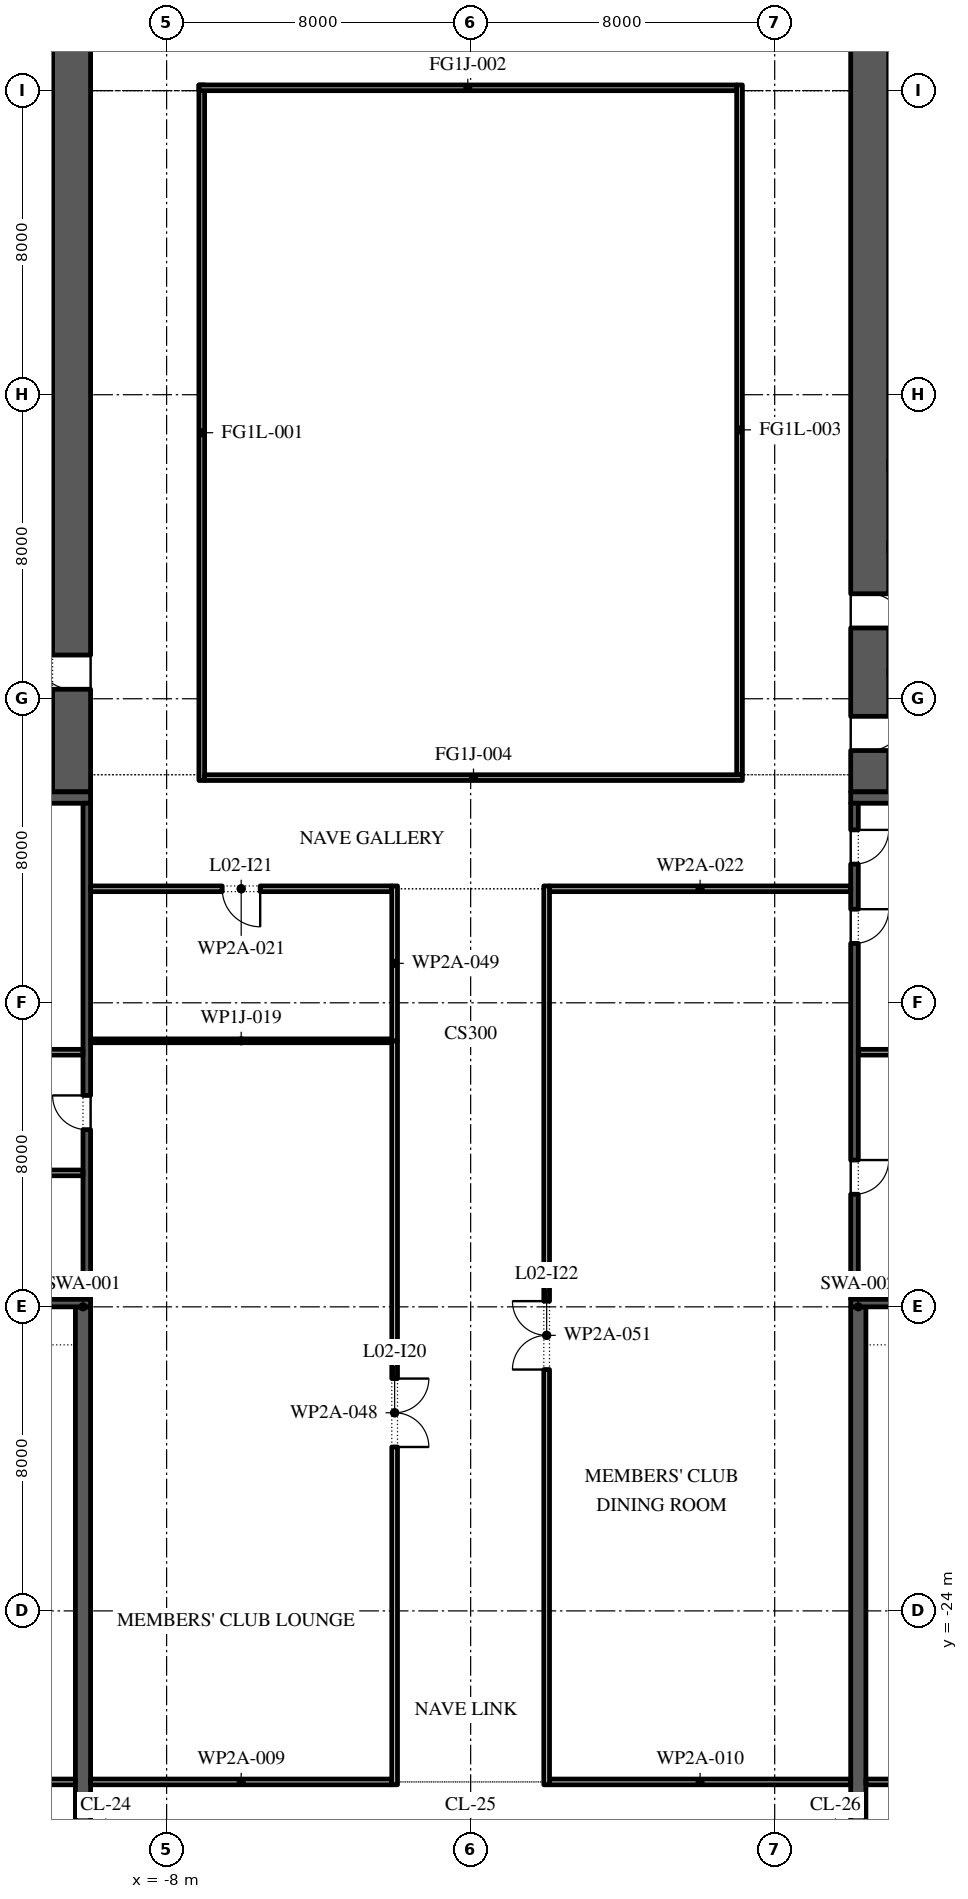
"""IFC4 building model, lengths in metres.
Left out: names, types, materials, properties, quantities, classifications, styles, units other than length and angle.
Written with IfcOpenShell. Run it as: python <this file> out.ifc"""

import sys

from ifc_helpers import new_model, si_unit, direction, frame, frame_2d, origin, place, context, subcontext, project, spatial, rectangle, extrude, element, fill, save


model = new_model("IFC4")
c1 = context("Model", 3, precision=1e-05, world=origin(), true_north=direction((0.0, 1.0)))
c2 = subcontext(c1, "Body", "Model", "MODEL_VIEW")
j1 = project(units=[si_unit("LENGTHUNIT", "METRE"), si_unit("PLANEANGLEUNIT", "RADIAN")], contexts=[c1])
p1 = place(None, origin())
s1 = spatial("IfcSite", under=j1, at=p1, CompositionType="ELEMENT")
p2 = place(p1, origin())
s2 = spatial("IfcBuilding", under=s1, at=p2, CompositionType="ELEMENT")
p3 = place(p2, frame((0.0, 0.0, 14.0)))
s3 = spatial("IfcBuildingStorey", under=s2, at=p3, CompositionType="ELEMENT", Elevation=14.0)
for number, where, z_axis, x_axis in (
    (1, (-10.2, -31.0, 0.0), (0.0, 0.0, 1.0), (0.0, 1.0, 0.0)),
    (2, (10.2, -31.0, 0.0), (0.0, 0.0, 1.0), (0.0, 1.0, 0.0)),
):
    element("IfcWall", number, at=place(p3, frame(where, z_axis=z_axis, x_axis=x_axis)), inside=s3, PredefinedType="SHEAR", context=c2, shape_type="SweptSolid", body=[
        extrude(rectangle(XDim=15.0, YDim=0.4, at=frame_2d((7.5, 0.0))), origin(), (0.0, 0.0, 1.0), 4.9),
    ])
p4 = place(p3, frame((-7.075, -2.15, 0.0), z_axis=(0.0, 0.0, 1.0), x_axis=(0.0, 1.0, 0.0)))
e3 = element("IfcWall", 3, at=p4, inside=s3, PredefinedType="STANDARD", context=c2, shape_type="SweptSolid", body=[
    extrude(rectangle(XDim=18.3, YDim=0.15, at=frame_2d((9.15, 0.0))), origin(), (0.0, 0.0, 1.0), 4.9),
])
p5 = place(p3, frame((-7.15, 16.075, 0.0), z_axis=(0.0, 0.0, 1.0), x_axis=(1.0, 0.0, 0.0)))
e4 = element("IfcWall", 4, at=p5, inside=s3, PredefinedType="STANDARD", context=c2, shape_type="SweptSolid", body=[
    extrude(rectangle(XDim=14.15, YDim=0.15, at=frame_2d((7.075, 0.0))), origin(), (0.0, 0.0, 1.0), 3.92),
])
p6 = place(p3, frame((7.075, 16.15, 0.0), z_axis=(0.0, 0.0, 1.0), x_axis=(0.0, -1.0, 0.0)))
e5 = element("IfcWall", 5, at=p6, inside=s3, PredefinedType="STANDARD", context=c2, shape_type="SweptSolid", body=[
    extrude(rectangle(XDim=18.15, YDim=0.15, at=frame_2d((9.075, 0.0))), origin(), (0.0, 0.0, 1.0), 4.9),
])
p7 = place(p3, frame((7.15, -2.075, 0.0), z_axis=(0.0, 0.0, 1.0), x_axis=(-1.0, 0.0, 0.0)))
e6 = element("IfcWall", 6, at=p7, inside=s3, PredefinedType="STANDARD", context=c2, shape_type="SweptSolid", body=[
    extrude(rectangle(XDim=14.15, YDim=0.15, at=frame_2d((7.075, 0.0))), origin(), (0.0, 0.0, 1.0), 3.92),
])
p8 = place(p3, frame((-10.5, -2.45, 0.0), z_axis=(0.0, 0.0, 1.0), x_axis=(0.0, 1.0, 0.0)))
e7 = element("IfcWall", 7, at=p8, inside=s3, PredefinedType="SHEAR", context=c2, shape_type="SweptSolid", body=[
    extrude(rectangle(XDim=27.9, YDim=1.0, at=frame_2d((13.95, 0.0))), origin(), (0.0, 0.0, 1.0), 4.9),
])
p9 = place(p8, frame((23.65, 0.0, 0.0)))
e8 = element("IfcOpeningElement", 8, at=p9, cuts=e7, PredefinedType="OPENING", context=c2, shape_type="SweptSolid", body=[
    extrude(rectangle(XDim=2.4, YDim=2.1, at=frame_2d((1.2, 1.05))), frame((0.0, 0.51, 0.0), z_axis=(0.0, -1.0, 0.0), x_axis=(1.0, 0.0, 0.0)), (0.0, 0.0, 1.0), 1.02),
])
p10 = place(p8, frame((2.7, 0.0, 0.0)))
e9 = element("IfcOpeningElement", 9, at=p10, cuts=e7, PredefinedType="OPENING", context=c2, shape_type="SweptSolid", body=[
    extrude(rectangle(XDim=0.9, YDim=2.1, at=frame_2d((0.45, 1.05))), frame((0.0, 0.51, 0.0), z_axis=(0.0, -1.0, 0.0), x_axis=(1.0, 0.0, 0.0)), (0.0, 0.0, 1.0), 1.02),
])
p11 = place(p3, frame((-22.0, -2.6, 0.0), z_axis=(0.0, 0.0, 1.0), x_axis=(1.0, 0.0, 0.0)))
e10 = element("IfcWall", 10, at=p11, inside=s3, PredefinedType="SHEAR", context=c2, shape_type="SweptSolid", body=[
    extrude(rectangle(XDim=12.0, YDim=0.3, at=frame_2d((6.0, 0.0))), origin(), (0.0, 0.0, 1.0), 4.9),
])
p12 = place(p3, frame((-10.1, -15.8, 0.0), z_axis=(0.0, 0.0, 1.0), x_axis=(0.0, 1.0, 0.0)))
e11 = element("IfcWall", 11, at=p12, inside=s3, PredefinedType="SHEAR", context=c2, shape_type="SweptSolid", body=[
    extrude(rectangle(XDim=13.05, YDim=0.2, at=frame_2d((6.525, 0.0))), origin(), (0.0, 0.0, 1.0), 4.9),
])
p13 = place(p12, frame((4.462, 0.0, 0.0)))
e12 = element("IfcOpeningElement", 12, at=p13, cuts=e11, PredefinedType="OPENING", context=c2, shape_type="SweptSolid", body=[
    extrude(rectangle(XDim=0.9, YDim=2.1, at=frame_2d((0.45, 1.05))), frame((0.0, 0.11, 0.0), z_axis=(0.0, -1.0, 0.0), x_axis=(1.0, 0.0, 0.0)), (0.0, 0.0, 1.0), 0.22),
])
p14 = place(p3, frame((-22.0, -15.9, 0.0), z_axis=(0.0, 0.0, 1.0), x_axis=(1.0, 0.0, 0.0)))
e13 = element("IfcWall", 13, at=p14, inside=s3, PredefinedType="SHEAR", context=c2, shape_type="SweptSolid", body=[
    extrude(rectangle(XDim=12.0, YDim=0.2, at=frame_2d((6.0, 0.0))), origin(), (0.0, 0.0, 1.0), 4.9),
])
for number, where, z_axis, x_axis in (
    (14, (-21.8, -9.3, 0.0), (0.0, 0.0, 1.0), (1.0, 0.0, 0.0)),
    (15, (-21.8, -12.475, 0.0), (0.0, 0.0, 1.0), (1.0, 0.0, 0.0)),
):
    element("IfcWall", number, at=place(p3, frame(where, z_axis=z_axis, x_axis=x_axis)), inside=s3, PredefinedType="PARTITIONING", context=c2, shape_type="SweptSolid", body=[
        extrude(rectangle(XDim=11.6, YDim=0.15, at=frame_2d((5.8, 0.0))), origin(), (0.0, 0.0, 1.0), 4.9),
    ])
p15 = place(p3, frame((10.5, -2.45, 0.0), z_axis=(0.0, 0.0, 1.0), x_axis=(0.0, 1.0, 0.0)))
e16 = element("IfcWall", 16, at=p15, inside=s3, PredefinedType="SHEAR", context=c2, shape_type="SweptSolid", body=[
    extrude(rectangle(XDim=27.9, YDim=1.0, at=frame_2d((13.95, 0.0))), origin(), (0.0, 0.0, 1.0), 4.9),
])
p16 = place(p15, frame((23.65, 0.0, 0.0)))
e17 = element("IfcOpeningElement", 17, at=p16, cuts=e16, PredefinedType="OPENING", context=c2, shape_type="SweptSolid", body=[
    extrude(rectangle(XDim=2.4, YDim=2.1, at=frame_2d((1.2, 1.05))), frame((0.0, 0.51, 0.0), z_axis=(0.0, -1.0, 0.0), x_axis=(1.0, 0.0, 0.0)), (0.0, 0.0, 1.0), 1.02),
])
p17 = place(p15, frame((1.087, 0.0, 0.0)))
e18 = element("IfcOpeningElement", 18, at=p17, cuts=e16, PredefinedType="OPENING", context=c2, shape_type="SweptSolid", body=[
    extrude(rectangle(XDim=0.9, YDim=2.1, at=frame_2d((0.45, 1.05))), frame((0.0, 0.51, 0.0), z_axis=(0.0, -1.0, 0.0), x_axis=(1.0, 0.0, 0.0)), (0.0, 0.0, 1.0), 1.02),
])
p18 = place(p15, frame((4.312, 0.0, 0.0)))
e19 = element("IfcOpeningElement", 19, at=p18, cuts=e16, PredefinedType="OPENING", context=c2, shape_type="SweptSolid", body=[
    extrude(rectangle(XDim=0.9, YDim=2.1, at=frame_2d((0.45, 1.05))), frame((0.0, 0.51, 0.0), z_axis=(0.0, -1.0, 0.0), x_axis=(1.0, 0.0, 0.0)), (0.0, 0.0, 1.0), 1.02),
])
p19 = place(p3, frame((10.0, -2.6, 0.0), z_axis=(0.0, 0.0, 1.0), x_axis=(1.0, 0.0, 0.0)))
e20 = element("IfcWall", 20, at=p19, inside=s3, PredefinedType="SHEAR", context=c2, shape_type="SweptSolid", body=[
    extrude(rectangle(XDim=12.0, YDim=0.3, at=frame_2d((6.0, 0.0))), origin(), (0.0, 0.0, 1.0), 4.9),
])
p20 = place(p3, frame((10.1, -15.8, 0.0), z_axis=(0.0, 0.0, 1.0), x_axis=(0.0, 1.0, 0.0)))
e21 = element("IfcWall", 21, at=p20, inside=s3, PredefinedType="SHEAR", context=c2, shape_type="SweptSolid", body=[
    extrude(rectangle(XDim=13.05, YDim=0.2, at=frame_2d((6.525, 0.0))), origin(), (0.0, 0.0, 1.0), 4.9),
])
p21 = place(p20, frame((2.762, 0.0, 0.0)))
e22 = element("IfcOpeningElement", 22, at=p21, cuts=e21, PredefinedType="OPENING", context=c2, shape_type="SweptSolid", body=[
    extrude(rectangle(XDim=0.9, YDim=2.1, at=frame_2d((0.45, 1.05))), frame((0.0, 0.11, 0.0), z_axis=(0.0, -1.0, 0.0), x_axis=(1.0, 0.0, 0.0)), (0.0, 0.0, 1.0), 0.22),
])
p22 = place(p20, frame((9.363, 0.0, 0.0)))
e23 = element("IfcOpeningElement", 23, at=p22, cuts=e21, PredefinedType="OPENING", context=c2, shape_type="SweptSolid", body=[
    extrude(rectangle(XDim=0.9, YDim=2.1, at=frame_2d((0.45, 1.05))), frame((0.0, 0.11, 0.0), z_axis=(0.0, -1.0, 0.0), x_axis=(1.0, 0.0, 0.0)), (0.0, 0.0, 1.0), 0.22),
])
p23 = place(p20, frame((11.45, 0.0, 0.0)))
e24 = element("IfcOpeningElement", 24, at=p23, cuts=e21, PredefinedType="OPENING", context=c2, shape_type="SweptSolid", body=[
    extrude(rectangle(XDim=0.9, YDim=2.1, at=frame_2d((0.45, 1.05))), frame((0.0, 0.11, 0.0), z_axis=(0.0, -1.0, 0.0), x_axis=(1.0, 0.0, 0.0)), (0.0, 0.0, 1.0), 0.22),
])
p24 = place(p3, frame((10.0, -15.9, 0.0), z_axis=(0.0, 0.0, 1.0), x_axis=(1.0, 0.0, 0.0)))
e25 = element("IfcWall", 25, at=p24, inside=s3, PredefinedType="SHEAR", context=c2, shape_type="SweptSolid", body=[
    extrude(rectangle(XDim=12.0, YDim=0.2, at=frame_2d((6.0, 0.0))), origin(), (0.0, 0.0, 1.0), 4.9),
])
p25 = place(p3, frame((10.2, -9.3, 0.0), z_axis=(0.0, 0.0, 1.0), x_axis=(1.0, 0.0, 0.0)))
e26 = element("IfcWall", 26, at=p25, inside=s3, PredefinedType="PARTITIONING", context=c2, shape_type="SweptSolid", body=[
    extrude(rectangle(XDim=5.8, YDim=0.15, at=frame_2d((2.9, 0.0))), origin(), (0.0, 0.0, 1.0), 4.9),
])
p26 = place(p3, frame((-21.925, -28.5, 0.0), z_axis=(0.0, 0.0, 1.0), x_axis=(1.0, 0.0, 0.0)))
e27 = element("IfcWall", 27, at=p26, inside=s3, PredefinedType="PARTITIONING", context=c2, shape_type="SweptSolid", body=[
    extrude(rectangle(XDim=11.525, YDim=0.15, at=frame_2d((5.763, 0.0))), origin(), (0.0, 0.0, 1.0), 4.9),
])
for number, where, z_axis, x_axis in (
    (28, (-10.0, -28.5, 0.0), (0.0, 0.0, 1.0), (1.0, 0.0, 0.0)),
    (29, (2.075, -28.5, 0.0), (0.0, 0.0, 1.0), (1.0, 0.0, 0.0)),
):
    element("IfcWall", number, at=place(p3, frame(where, z_axis=z_axis, x_axis=x_axis)), inside=s3, PredefinedType="PARTITIONING", context=c2, shape_type="SweptSolid", body=[
        extrude(rectangle(XDim=7.925, YDim=0.15, at=frame_2d((3.962, 0.0))), origin(), (0.0, 0.0, 1.0), 4.9),
    ])
p27 = place(p3, frame((10.4, -28.5, 0.0), z_axis=(0.0, 0.0, 1.0), x_axis=(1.0, 0.0, 0.0)))
e30 = element("IfcWall", 30, at=p27, inside=s3, PredefinedType="PARTITIONING", context=c2, shape_type="SweptSolid", body=[
    extrude(rectangle(XDim=11.525, YDim=0.15, at=frame_2d((5.763, 0.0))), origin(), (0.0, 0.0, 1.0), 4.9),
])
p28 = place(p3, frame((-10.0, -9.0, 0.0), z_axis=(0.0, 0.0, 1.0), x_axis=(1.0, 0.0, 0.0)))
e31 = element("IfcWall", 31, at=p28, inside=s3, PredefinedType="PARTITIONING", context=c2, shape_type="SweptSolid", body=[
    extrude(rectangle(XDim=7.925, YDim=0.1, at=frame_2d((3.962, 0.0))), origin(), (0.0, 0.0, 1.0), 4.9),
])
p29 = place(p3, frame((-10.0, -5.0, 0.0), z_axis=(0.0, 0.0, 1.0), x_axis=(1.0, 0.0, 0.0)))
e32 = element("IfcWall", 32, at=p29, inside=s3, PredefinedType="PARTITIONING", context=c2, shape_type="SweptSolid", body=[
    extrude(rectangle(XDim=7.925, YDim=0.15, at=frame_2d((3.962, 0.0))), origin(), (0.0, 0.0, 1.0), 4.9),
])
p30 = place(p29, frame((3.462, 0.0, 0.0)))
e33 = element("IfcOpeningElement", 33, at=p30, cuts=e32, PredefinedType="OPENING", context=c2, shape_type="SweptSolid", body=[
    extrude(rectangle(XDim=1.0, YDim=2.1, at=frame_2d((0.5, 1.05))), frame((0.0, 0.085, 0.0), z_axis=(0.0, -1.0, 0.0), x_axis=(1.0, 0.0, 0.0)), (0.0, 0.0, 1.0), 0.17),
])
p31 = place(p3, frame((2.075, -5.0, 0.0), z_axis=(0.0, 0.0, 1.0), x_axis=(1.0, 0.0, 0.0)))
e34 = element("IfcWall", 34, at=p31, inside=s3, PredefinedType="PARTITIONING", context=c2, shape_type="SweptSolid", body=[
    extrude(rectangle(XDim=7.925, YDim=0.15, at=frame_2d((3.962, 0.0))), origin(), (0.0, 0.0, 1.0), 4.9),
])
p32 = place(p3, frame((-2.0, -28.575, 0.0), z_axis=(0.0, 0.0, 1.0), x_axis=(0.0, 1.0, 0.0)))
e35 = element("IfcWall", 35, at=p32, inside=s3, PredefinedType="PARTITIONING", context=c2, shape_type="SweptSolid", body=[
    extrude(rectangle(XDim=19.575, YDim=0.15, at=frame_2d((9.788, 0.0))), origin(), (0.0, 0.0, 1.0), 4.9),
])
p33 = place(p32, frame((8.887, 0.0, 0.0)))
e36 = element("IfcOpeningElement", 36, at=p33, cuts=e35, PredefinedType="OPENING", context=c2, shape_type="SweptSolid", body=[
    extrude(rectangle(XDim=1.8, YDim=2.1, at=frame_2d((0.9, 1.05))), frame((0.0, 0.085, 0.0), z_axis=(0.0, -1.0, 0.0), x_axis=(1.0, 0.0, 0.0)), (0.0, 0.0, 1.0), 0.17),
])
p34 = place(p3, frame((-2.0, -9.0, 0.0), z_axis=(0.0, 0.0, 1.0), x_axis=(0.0, 1.0, 0.0)))
e37 = element("IfcWall", 37, at=p34, inside=s3, PredefinedType="PARTITIONING", context=c2, shape_type="SweptSolid", body=[
    extrude(rectangle(XDim=4.075, YDim=0.15, at=frame_2d((2.038, 0.0))), origin(), (0.0, 0.0, 1.0), 4.9),
])
p35 = place(p3, frame((2.0, -28.575, 0.0), z_axis=(0.0, 0.0, 1.0), x_axis=(0.0, 1.0, 0.0)))
e38 = element("IfcWall", 38, at=p35, inside=s3, PredefinedType="PARTITIONING", context=c2, shape_type="SweptSolid", body=[
    extrude(rectangle(XDim=23.65, YDim=0.15, at=frame_2d((11.825, 0.0))), origin(), (0.0, 0.0, 1.0), 4.9),
])
p36 = place(p35, frame((10.925, 0.0, 0.0)))
e39 = element("IfcOpeningElement", 39, at=p36, cuts=e38, PredefinedType="OPENING", context=c2, shape_type="SweptSolid", body=[
    extrude(rectangle(XDim=1.8, YDim=2.1, at=frame_2d((0.9, 1.05))), frame((0.0, 0.085, 0.0), z_axis=(0.0, -1.0, 0.0), x_axis=(1.0, 0.0, 0.0)), (0.0, 0.0, 1.0), 0.17),
])
p37 = place(p10, origin())
e40 = element("IfcDoor", 40, at=p37, inside=s3, OperationType="SINGLE_SWING_LEFT", PredefinedType="DOOR", context=c2, shape_type="SweptSolid", body=[
    extrude(rectangle(XDim=0.9, YDim=2.1, at=frame_2d((0.45, 1.05))), frame((0.0, 0.5, 0.0), z_axis=(0.0, -1.0, 0.0), x_axis=(1.0, 0.0, 0.0)), (0.0, 0.0, 1.0), 0.05),
])
fill(e9, e40)
p38 = place(p13, origin())
e41 = element("IfcDoor", 41, at=p38, inside=s3, OperationType="SINGLE_SWING_LEFT", PredefinedType="DOOR", context=c2, shape_type="SweptSolid", body=[
    extrude(rectangle(XDim=0.9, YDim=2.1, at=frame_2d((0.45, 1.05))), frame((0.0, 0.1, 0.0), z_axis=(0.0, -1.0, 0.0), x_axis=(1.0, 0.0, 0.0)), (0.0, 0.0, 1.0), 0.05),
])
fill(e12, e41)
p39 = place(p17, frame((0.9, -0.95, 0.0), z_axis=(0.0, 0.0, 1.0), x_axis=(-1.0, 0.0, 0.0)))
e42 = element("IfcDoor", 42, at=p39, inside=s3, OperationType="SINGLE_SWING_RIGHT", PredefinedType="DOOR", context=c2, shape_type="SweptSolid", body=[
    extrude(rectangle(XDim=0.9, YDim=2.1, at=frame_2d((0.45, 1.05))), frame((0.0, -0.45, 0.0), z_axis=(0.0, -1.0, 0.0), x_axis=(1.0, 0.0, 0.0)), (0.0, 0.0, 1.0), 0.05),
])
fill(e18, e42)
p40 = place(p18, frame((0.9, -0.95, 0.0), z_axis=(0.0, 0.0, 1.0), x_axis=(-1.0, 0.0, 0.0)))
e43 = element("IfcDoor", 43, at=p40, inside=s3, OperationType="SINGLE_SWING_LEFT", PredefinedType="DOOR", context=c2, shape_type="SweptSolid", body=[
    extrude(rectangle(XDim=0.9, YDim=2.1, at=frame_2d((0.45, 1.05))), frame((0.0, -0.45, 0.0), z_axis=(0.0, -1.0, 0.0), x_axis=(1.0, 0.0, 0.0)), (0.0, 0.0, 1.0), 0.05),
])
fill(e19, e43)
p41 = place(p21, frame((0.9, -0.15, 0.0), z_axis=(0.0, 0.0, 1.0), x_axis=(-1.0, 0.0, 0.0)))
e44 = element("IfcDoor", 44, at=p41, inside=s3, OperationType="SINGLE_SWING_RIGHT", PredefinedType="DOOR", context=c2, shape_type="SweptSolid", body=[
    extrude(rectangle(XDim=0.9, YDim=2.1, at=frame_2d((0.45, 1.05))), frame((0.0, -0.05, 0.0), z_axis=(0.0, -1.0, 0.0), x_axis=(1.0, 0.0, 0.0)), (0.0, 0.0, 1.0), 0.05),
])
fill(e22, e44)
p42 = place(p22, frame((0.9, -0.15, 0.0), z_axis=(0.0, 0.0, 1.0), x_axis=(-1.0, 0.0, 0.0)))
e45 = element("IfcDoor", 45, at=p42, inside=s3, OperationType="SINGLE_SWING_RIGHT", PredefinedType="DOOR", context=c2, shape_type="SweptSolid", body=[
    extrude(rectangle(XDim=0.9, YDim=2.1, at=frame_2d((0.45, 1.05))), frame((0.0, -0.05, 0.0), z_axis=(0.0, -1.0, 0.0), x_axis=(1.0, 0.0, 0.0)), (0.0, 0.0, 1.0), 0.05),
])
fill(e23, e45)
p43 = place(p23, frame((0.9, -0.15, 0.0), z_axis=(0.0, 0.0, 1.0), x_axis=(-1.0, 0.0, 0.0)))
e46 = element("IfcDoor", 46, at=p43, inside=s3, OperationType="SINGLE_SWING_RIGHT", PredefinedType="DOOR", context=c2, shape_type="SweptSolid", body=[
    extrude(rectangle(XDim=0.9, YDim=2.1, at=frame_2d((0.45, 1.05))), frame((0.0, -0.05, 0.0), z_axis=(0.0, -1.0, 0.0), x_axis=(1.0, 0.0, 0.0)), (0.0, 0.0, 1.0), 0.05),
])
fill(e24, e46)
p44 = place(p33, frame((1.8, 0.0, 0.0), z_axis=(0.0, 0.0, 1.0), x_axis=(-1.0, 0.0, 0.0)))
e47 = element("IfcDoor", 47, at=p44, inside=s3, OperationType="SINGLE_SWING_RIGHT", PredefinedType="DOOR", context=c2, shape_type="SweptSolid", body=[
    extrude(rectangle(XDim=1.8, YDim=2.1, at=frame_2d((0.9, 1.05))), frame((0.0, 0.025, 0.0), z_axis=(0.0, -1.0, 0.0), x_axis=(1.0, 0.0, 0.0)), (0.0, 0.0, 1.0), 0.05),
])
fill(e36, e47)
p45 = place(p30, frame((1.0, 0.0, 0.0), z_axis=(0.0, 0.0, 1.0), x_axis=(-1.0, 0.0, 0.0)))
e48 = element("IfcDoor", 48, at=p45, inside=s3, OperationType="SINGLE_SWING_RIGHT", PredefinedType="DOOR", context=c2, shape_type="SweptSolid", body=[
    extrude(rectangle(XDim=1.0, YDim=2.1, at=frame_2d((0.5, 1.05))), frame((0.0, 0.025, 0.0), z_axis=(0.0, -1.0, 0.0), x_axis=(1.0, 0.0, 0.0)), (0.0, 0.0, 1.0), 0.05),
])
fill(e33, e48)
p46 = place(p36, origin())
e49 = element("IfcDoor", 49, at=p46, inside=s3, OperationType="SINGLE_SWING_LEFT", PredefinedType="DOOR", context=c2, shape_type="SweptSolid", body=[
    extrude(rectangle(XDim=1.8, YDim=2.1, at=frame_2d((0.9, 1.05))), frame((0.0, 0.025, 0.0), z_axis=(0.0, -1.0, 0.0), x_axis=(1.0, 0.0, 0.0)), (0.0, 0.0, 1.0), 0.05),
])
fill(e39, e49)
save(model, sys.argv[1])
